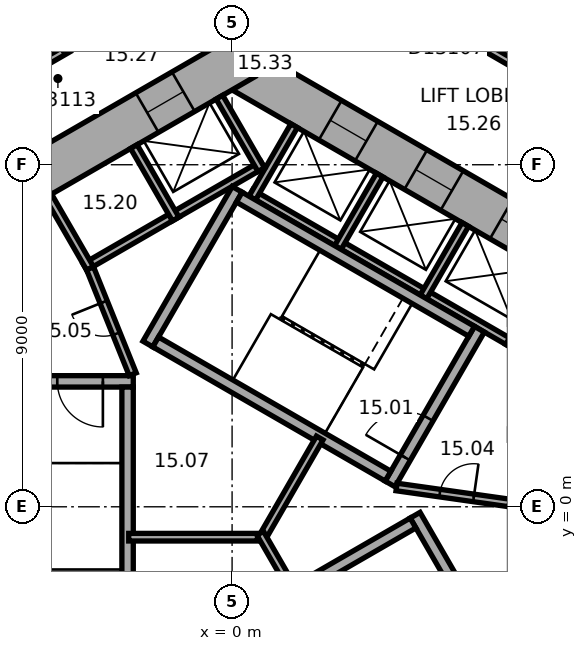
"""IFC4 building model, lengths in metres.
Left out: names, types, materials, properties, quantities, classifications, styles, units other than length and angle.
Written with IfcOpenShell. Run it as: python <this file> out.ifc"""

import sys

from ifc_helpers import new_model, si_unit, direction, frame, frame_2d, origin, place, context, subcontext, project, spatial, rectangle, extrude, element, fill, save


model = new_model("IFC4")
c1 = context("Model", 3, precision=1e-05, world=origin(), true_north=direction((0.0, 1.0)))
c2 = subcontext(c1, "Body", "Model", "MODEL_VIEW")
j1 = project(units=[si_unit("LENGTHUNIT", "METRE"), si_unit("PLANEANGLEUNIT", "RADIAN")], contexts=[c1])
p1 = place(None, origin())
s1 = spatial("IfcSite", under=j1, at=p1, CompositionType="ELEMENT")
p2 = place(p1, origin())
s2 = spatial("IfcBuilding", under=s1, at=p2, CompositionType="ELEMENT")
p3 = place(p2, frame((0.0, 0.0, 70.4)))
s3 = spatial("IfcBuildingStorey", under=s2, at=p3, CompositionType="ELEMENT", Elevation=70.4)
p4 = place(p3, frame((10.4, 5.658, 0.0), z_axis=(0.0, 0.0, 1.0), x_axis=(-0.866021384402, 0.500006961711, 0.0)))
e1 = element("IfcWall", 1, at=p4, inside=s3, PredefinedType="SHEAR", context=c2, shape_type="SweptSolid", body=[
    extrude(rectangle(XDim=12.355, YDim=1.2, at=frame_2d((6.178, 0.0))), origin(), (0.0, 0.0, 1.0), 3.3),
])
p5 = place(p4, frame((2.728, 0.0, 0.0)))
e2 = element("IfcOpeningElement", 2, at=p5, cuts=e1, PredefinedType="OPENING", context=c2, shape_type="SweptSolid", body=[
    extrude(rectangle(XDim=1.1, YDim=2.1, at=frame_2d((0.55, 1.05))), frame((0.0, 0.61, 0.0), z_axis=(0.0, -1.0, 0.0), x_axis=(1.0, 0.0, 0.0)), (0.0, 0.0, 1.0), 1.22),
])
p6 = place(p4, frame((5.328, 0.0, 0.0)))
e3 = element("IfcOpeningElement", 3, at=p6, cuts=e1, PredefinedType="OPENING", context=c2, shape_type="SweptSolid", body=[
    extrude(rectangle(XDim=1.1, YDim=2.1, at=frame_2d((0.55, 1.05))), frame((0.0, 0.61, 0.0), z_axis=(0.0, -1.0, 0.0), x_axis=(1.0, 0.0, 0.0)), (0.0, 0.0, 1.0), 1.22),
])
p7 = place(p4, frame((7.928, 0.0, 0.0)))
e4 = element("IfcOpeningElement", 4, at=p7, cuts=e1, PredefinedType="OPENING", context=c2, shape_type="SweptSolid", body=[
    extrude(rectangle(XDim=1.1, YDim=2.1, at=frame_2d((0.55, 1.05))), frame((0.0, 0.61, 0.0), z_axis=(0.0, -1.0, 0.0), x_axis=(1.0, 0.0, 0.0)), (0.0, 0.0, 1.0), 1.22),
])
p8 = place(p3, frame((0.3, 11.836, 0.0), z_axis=(0.0, 0.0, 1.0), x_axis=(-0.866021384402, -0.500006961711, 0.0)))
e5 = element("IfcWall", 5, at=p8, inside=s3, PredefinedType="SHEAR", context=c2, shape_type="SweptSolid", body=[
    extrude(rectangle(XDim=12.355, YDim=1.2, at=frame_2d((6.178, 0.0))), origin(), (0.0, 0.0, 1.0), 3.3),
])
p9 = place(p8, frame((6.378, 0.0, 0.0)))
e6 = element("IfcOpeningElement", 6, at=p9, cuts=e5, PredefinedType="OPENING", context=c2, shape_type="SweptSolid", body=[
    extrude(rectangle(XDim=1.5, YDim=2.1, at=frame_2d((0.75, 1.05))), frame((0.0, 0.61, 0.0), z_axis=(0.0, -1.0, 0.0), x_axis=(1.0, 0.0, 0.0)), (0.0, 0.0, 1.0), 1.22),
])
p10 = place(p8, frame((1.828, 0.0, 0.0)))
e7 = element("IfcOpeningElement", 7, at=p10, cuts=e5, PredefinedType="OPENING", context=c2, shape_type="SweptSolid", body=[
    extrude(rectangle(XDim=1.1, YDim=2.1, at=frame_2d((0.55, 1.05))), frame((0.0, 0.61, 0.0), z_axis=(0.0, -1.0, 0.0), x_axis=(1.0, 0.0, 0.0)), (0.0, 0.0, 1.0), 1.22),
])
p11 = place(p3, frame((7.424, 4.259, 0.0), z_axis=(0.0, 0.0, 1.0), x_axis=(-0.866026010844, 0.49999894854, 0.0)))
e8 = element("IfcWall", 8, at=p11, inside=s3, PredefinedType="PARTITIONING", context=c2, shape_type="SweptSolid", body=[
    extrude(rectangle(XDim=8.0, YDim=0.2, at=frame_2d((4.0, 0.0))), origin(), (0.0, 0.0, 1.0), 3.05),
])
for number, where, z_axis, x_axis in (
    (9, (7.287, 4.222, 0.0), (0.0, 0.0, 1.0), (0.5, 0.866, 0.0)),
    (10, (5.036, 5.522, 0.0), (0.0, 0.0, 1.0), (0.5, 0.866, 0.0)),
    (11, (2.784, 6.822, 0.0), (0.0, 0.0, 1.0), (0.5, 0.866, 0.0)),
    (12, (0.532, 8.122, 0.0), (0.0, 0.0, 1.0), (0.5, 0.866, 0.0)),
):
    element("IfcWall", number, at=place(p3, frame(where, z_axis=z_axis, x_axis=x_axis)), inside=s3, PredefinedType="PARTITIONING", context=c2, shape_type="SweptSolid", body=[
        extrude(rectangle(XDim=2.2, YDim=0.2, at=frame_2d((1.1, 0.0))), origin(), (0.0, 0.0, 1.0), 3.05),
    ])
p12 = place(p3, frame((0.803, 9.009, 0.0), z_axis=(0.0, 0.0, 1.0), x_axis=(-0.866028230842, -0.499995103361, 0.0)))
e13 = element("IfcWall", 13, at=p12, inside=s3, PredefinedType="PARTITIONING", context=c2, shape_type="SweptSolid", body=[
    extrude(rectangle(XDim=5.4, YDim=0.2, at=frame_2d((2.7, 0.0))), origin(), (0.0, 0.0, 1.0), 3.05),
])
p13 = place(p3, frame((0.767, 8.872, 0.0), z_axis=(0.0, 0.0, 1.0), x_axis=(-0.499994660107, 0.866028486751, 0.0)))
e14 = element("IfcWall", 14, at=p13, inside=s3, PredefinedType="PARTITIONING", context=c2, shape_type="SweptSolid", body=[
    extrude(rectangle(XDim=2.2, YDim=0.2, at=frame_2d((1.1, 0.0))), origin(), (0.0, 0.0, 1.0), 3.05),
])
for number, where, z_axis, x_axis in (
    (15, (-1.485, 7.572, 0.0), (0.0, 0.0, 1.0), (-0.5, 0.866, 0.0)),
    (16, (-3.737, 6.272, 0.0), (0.0, 0.0, 1.0), (-0.5, 0.866, 0.0)),
):
    element("IfcWall", number, at=place(p3, frame(where, z_axis=z_axis, x_axis=x_axis)), inside=s3, PredefinedType="PARTITIONING", context=c2, shape_type="SweptSolid", body=[
        extrude(rectangle(XDim=2.2, YDim=0.2, at=frame_2d((1.1, 0.0))), origin(), (0.0, 0.0, 1.0), 3.05),
    ])
p14 = place(p3, frame((4.158, 0.602, 0.0), z_axis=(0.0, 0.0, 1.0), x_axis=(0.499977259774, 0.866038532462, 0.0)))
e17 = element("IfcWall", 17, at=p14, inside=s3, PredefinedType="SHEAR", context=c2, shape_type="SweptSolid", body=[
    extrude(rectangle(XDim=4.7, YDim=0.3, at=frame_2d((2.35, 0.0))), origin(), (0.0, 0.0, 1.0), 3.05),
])
p15 = place(p14, frame((0.8, 0.0, 0.0)))
e18 = element("IfcOpeningElement", 18, at=p15, cuts=e17, PredefinedType="OPENING", context=c2, shape_type="SweptSolid", body=[
    extrude(rectangle(XDim=1.2, YDim=2.1, at=frame_2d((0.6, 1.05))), frame((0.0, 0.16, 0.0), z_axis=(0.0, -1.0, 0.0), x_axis=(1.0, 0.0, 0.0)), (0.0, 0.0, 1.0), 0.32),
])
p16 = place(p3, frame((-2.216, 4.282, 0.0), z_axis=(0.0, 0.0, 1.0), x_axis=(0.499977259774, 0.866038532462, 0.0)))
e19 = element("IfcWall", 19, at=p16, inside=s3, PredefinedType="SHEAR", context=c2, shape_type="SweptSolid", body=[
    extrude(rectangle(XDim=4.7, YDim=0.3, at=frame_2d((2.35, 0.0))), origin(), (0.0, 0.0, 1.0), 3.05),
])
for number, where, z_axis, x_axis in (
    (20, (4.103, 0.807, 0.0), (0.0, 0.0, 1.0), (-0.866, 0.5, 0.0)),
    (21, (6.303, 4.617, 0.0), (0.0, 0.0, 1.0), (-0.866, 0.5, 0.0)),
):
    element("IfcWall", number, at=place(p3, frame(where, z_axis=z_axis, x_axis=x_axis)), inside=s3, PredefinedType="SHEAR", context=c2, shape_type="SweptSolid", body=[
        extrude(rectangle(XDim=7.06, YDim=0.3, at=frame_2d((3.53, 0.0))), origin(), (0.0, 0.0, 1.0), 3.05),
    ])
p17 = place(p3, frame((-2.6, 3.3, 0.0), z_axis=(0.0, 0.0, 1.0), x_axis=(-1.0, 0.0, 0.0)))
e22 = element("IfcWall", 22, at=p17, inside=s3, PredefinedType="SHEAR", context=c2, shape_type="SweptSolid", body=[
    extrude(rectangle(XDim=4.7, YDim=0.3, at=frame_2d((2.35, 0.0))), origin(), (0.0, 0.0, 1.0), 3.05),
])
p18 = place(p17, frame((0.8, 0.0, 0.0)))
e23 = element("IfcOpeningElement", 23, at=p18, cuts=e22, PredefinedType="OPENING", context=c2, shape_type="SweptSolid", body=[
    extrude(rectangle(XDim=1.2, YDim=2.1, at=frame_2d((0.6, 1.05))), frame((0.0, 0.16, 0.0), z_axis=(0.0, -1.0, 0.0), x_axis=(1.0, 0.0, 0.0)), (0.0, 0.0, 1.0), 0.32),
])
p19 = place(p3, frame((-2.75, 3.15, 0.0), z_axis=(0.0, 0.0, 1.0), x_axis=(0.0, -1.0, 0.0)))
e24 = element("IfcWall", 24, at=p19, inside=s3, PredefinedType="SHEAR", context=c2, shape_type="SweptSolid", body=[
    extrude(rectangle(XDim=7.06, YDim=0.3, at=frame_2d((3.53, 0.0))), origin(), (0.0, 0.0, 1.0), 3.05),
])
p20 = place(p3, frame((4.816, -0.222, 0.0), z_axis=(0.0, 0.0, 1.0), x_axis=(0.499977259774, -0.866038532462, 0.0)))
e25 = element("IfcWall", 25, at=p20, inside=s3, PredefinedType="SHEAR", context=c2, shape_type="SweptSolid", body=[
    extrude(rectangle(XDim=4.7, YDim=0.3, at=frame_2d((2.35, 0.0))), origin(), (0.0, 0.0, 1.0), 3.05),
])
p21 = place(p3, frame((-1.353, -3.957, 0.0), z_axis=(0.0, 0.0, 1.0), x_axis=(0.866027801685, 0.499995846692, 0.0)))
e26 = element("IfcWall", 26, at=p21, inside=s3, PredefinedType="SHEAR", context=c2, shape_type="SweptSolid", body=[
    extrude(rectangle(XDim=7.06, YDim=0.3, at=frame_2d((3.53, 0.0))), origin(), (0.0, 0.0, 1.0), 3.05),
])
p22 = place(p3, frame((4.327, 0.521, 0.0), z_axis=(0.0, 0.0, 1.0), x_axis=(0.990124376366, -0.14019172346, 0.0)))
e27 = element("IfcWall", 27, at=p22, inside=s3, PredefinedType="PARTITIONING", context=c2, shape_type="SweptSolid", body=[
    extrude(rectangle(XDim=3.002, YDim=0.2, at=frame_2d((1.501, 0.0))), origin(), (0.0, 0.0, 1.0), 3.05),
])
p23 = place(p22, frame((1.15, 0.0, 0.0)))
e28 = element("IfcOpeningElement", 28, at=p23, cuts=e27, PredefinedType="OPENING", context=c2, shape_type="SweptSolid", body=[
    extrude(rectangle(XDim=0.9, YDim=2.1, at=frame_2d((0.45, 1.05))), frame((0.0, 0.11, 0.0), z_axis=(0.0, -1.0, 0.0), x_axis=(1.0, 0.0, 0.0)), (0.0, 0.0, 1.0), 0.22),
])
p24 = place(p3, frame((-2.615, 3.487, 0.0), z_axis=(0.0, 0.0, 1.0), x_axis=(-0.373576831041, 0.92759924068, 0.0)))
e29 = element("IfcWall", 29, at=p24, inside=s3, PredefinedType="PARTITIONING", context=c2, shape_type="SweptSolid", body=[
    extrude(rectangle(XDim=3.002, YDim=0.2, at=frame_2d((1.501, 0.0))), origin(), (0.0, 0.0, 1.0), 3.05),
])
p25 = place(p24, frame((1.15, 0.0, 0.0)))
e30 = element("IfcOpeningElement", 30, at=p25, cuts=e29, PredefinedType="OPENING", context=c2, shape_type="SweptSolid", body=[
    extrude(rectangle(XDim=0.9, YDim=2.1, at=frame_2d((0.45, 1.05))), frame((0.0, 0.11, 0.0), z_axis=(0.0, -1.0, 0.0), x_axis=(1.0, 0.0, 0.0)), (0.0, 0.0, 1.0), 0.22),
])
p26 = place(p3, frame((0.92, -0.8, 0.0), z_axis=(0.0, 0.0, 1.0), x_axis=(-1.0, 0.0, 0.0)))
e31 = element("IfcWall", 31, at=p26, inside=s3, PredefinedType="PARTITIONING", context=c2, shape_type="SweptSolid", body=[
    extrude(rectangle(XDim=3.64, YDim=0.2, at=frame_2d((1.82, 0.0))), origin(), (0.0, 0.0, 1.0), 3.05),
])
p27 = place(p3, frame((0.74, -0.904, 0.0), z_axis=(0.0, 0.0, 1.0), x_axis=(0.500028278809, 0.866009076391, 0.0)))
e32 = element("IfcWall", 32, at=p27, inside=s3, PredefinedType="PARTITIONING", context=c2, shape_type="SweptSolid", body=[
    extrude(rectangle(XDim=3.133, YDim=0.2, at=frame_2d((1.566, 0.0))), origin(), (0.0, 0.0, 1.0), 3.05),
])
p28 = place(p3, frame((0.74, -0.696, 0.0), z_axis=(0.0, 0.0, 1.0), x_axis=(0.499956301907, -0.86605063142, 0.0)))
e33 = element("IfcWall", 33, at=p28, inside=s3, PredefinedType="PARTITIONING", context=c2, shape_type="SweptSolid", body=[
    extrude(rectangle(XDim=1.747, YDim=0.2, at=frame_2d((0.874, 0.0))), origin(), (0.0, 0.0, 1.0), 3.05),
])
p29 = place(p3, frame((-4.309, 12.061, 0.0), z_axis=(0.0, 0.0, 1.0), x_axis=(-0.866020679205, -0.500008183122, 0.0)))
e34 = element("IfcWall", 34, at=p29, inside=s3, PredefinedType="PARTITIONING", context=c2, shape_type="SweptSolid", body=[
    extrude(rectangle(XDim=5.104, YDim=0.2, at=frame_2d((2.552, 0.0))), origin(), (0.0, 0.0, 1.0), 3.05),
])
p30 = place(p29, frame((0.185, 0.0, 0.0)))
e35 = element("IfcOpeningElement", 35, at=p30, cuts=e34, PredefinedType="OPENING", context=c2, shape_type="SweptSolid", body=[
    extrude(rectangle(XDim=0.9, YDim=2.1, at=frame_2d((0.45, 1.05))), frame((0.0, 0.11, 0.0), z_axis=(0.0, -1.0, 0.0), x_axis=(1.0, 0.0, 0.0)), (0.0, 0.0, 1.0), 0.22),
])
p31 = place(p29, frame((2.736, 0.0, 0.0)))
e36 = element("IfcOpeningElement", 36, at=p31, cuts=e34, PredefinedType="OPENING", context=c2, shape_type="SweptSolid", body=[
    extrude(rectangle(XDim=0.9, YDim=2.1, at=frame_2d((0.45, 1.05))), frame((0.0, 0.11, 0.0), z_axis=(0.0, -1.0, 0.0), x_axis=(1.0, 0.0, 0.0)), (0.0, 0.0, 1.0), 0.22),
])
p32 = place(p3, frame((10.885, 9.652, 0.0), z_axis=(0.0, 0.0, 1.0), x_axis=(-0.866033868542, 0.499985338323, 0.0)))
e37 = element("IfcWall", 37, at=p32, inside=s3, PredefinedType="PARTITIONING", context=c2, shape_type="SweptSolid", body=[
    extrude(rectangle(XDim=8.602, YDim=0.2, at=frame_2d((4.301, 0.0))), origin(), (0.0, 0.0, 1.0), 3.05),
])
p33 = place(p32, frame((5.302, 0.0, 0.0)))
e38 = element("IfcOpeningElement", 38, at=p33, cuts=e37, PredefinedType="OPENING", context=c2, shape_type="SweptSolid", body=[
    extrude(rectangle(XDim=0.9, YDim=2.1, at=frame_2d((0.45, 1.05))), frame((0.0, 0.11, 0.0), z_axis=(0.0, -1.0, 0.0), x_axis=(1.0, 0.0, 0.0)), (0.0, 0.0, 1.0), 0.22),
])
p34 = place(p15, origin())
e39 = element("IfcDoor", 39, at=p34, inside=s3, OperationType="SINGLE_SWING_RIGHT", PredefinedType="DOOR", context=c2, shape_type="SweptSolid", body=[
    extrude(rectangle(XDim=1.2, YDim=2.1, at=frame_2d((0.6, 1.05))), frame((0.0, 0.025, 0.0), z_axis=(0.0, -1.0, 0.0), x_axis=(1.0, 0.0, 0.0)), (0.0, 0.0, 1.0), 0.05),
])
fill(e18, e39)
p35 = place(p18, origin())
e40 = element("IfcDoor", 40, at=p35, inside=s3, OperationType="SINGLE_SWING_RIGHT", PredefinedType="DOOR", context=c2, shape_type="SweptSolid", body=[
    extrude(rectangle(XDim=1.2, YDim=2.1, at=frame_2d((0.6, 1.05))), frame((0.0, 0.025, 0.0), z_axis=(0.0, -1.0, 0.0), x_axis=(1.0, 0.0, 0.0)), (0.0, 0.0, 1.0), 0.05),
])
fill(e23, e40)
p36 = place(p23, origin())
e41 = element("IfcDoor", 41, at=p36, inside=s3, OperationType="SINGLE_SWING_LEFT", PredefinedType="DOOR", context=c2, shape_type="SweptSolid", body=[
    extrude(rectangle(XDim=0.9, YDim=2.1, at=frame_2d((0.45, 1.05))), frame((0.0, 0.025, 0.0), z_axis=(0.0, -1.0, 0.0), x_axis=(1.0, 0.0, 0.0)), (0.0, 0.0, 1.0), 0.05),
])
fill(e28, e41)
p37 = place(p25, origin())
e42 = element("IfcDoor", 42, at=p37, inside=s3, OperationType="SINGLE_SWING_LEFT", PredefinedType="DOOR", context=c2, shape_type="SweptSolid", body=[
    extrude(rectangle(XDim=0.9, YDim=2.1, at=frame_2d((0.45, 1.05))), frame((0.0, 0.025, 0.0), z_axis=(0.0, -1.0, 0.0), x_axis=(1.0, 0.0, 0.0)), (0.0, 0.0, 1.0), 0.05),
])
fill(e30, e42)
p38 = place(p5, origin())
e43 = element("IfcDoor", 43, at=p38, inside=s3, OperationType="DOUBLE_DOOR_SLIDING", PredefinedType="DOOR", context=c2, shape_type="SweptSolid", body=[
    extrude(rectangle(XDim=1.1, YDim=2.1, at=frame_2d((0.55, 1.05))), frame((0.0, 0.025, 0.0), z_axis=(0.0, -1.0, 0.0), x_axis=(1.0, 0.0, 0.0)), (0.0, 0.0, 1.0), 0.05),
])
fill(e2, e43)
p39 = place(p6, origin())
e44 = element("IfcDoor", 44, at=p39, inside=s3, OperationType="DOUBLE_DOOR_SLIDING", PredefinedType="DOOR", context=c2, shape_type="SweptSolid", body=[
    extrude(rectangle(XDim=1.1, YDim=2.1, at=frame_2d((0.55, 1.05))), frame((0.0, 0.025, 0.0), z_axis=(0.0, -1.0, 0.0), x_axis=(1.0, 0.0, 0.0)), (0.0, 0.0, 1.0), 0.05),
])
fill(e3, e44)
p40 = place(p7, origin())
e45 = element("IfcDoor", 45, at=p40, inside=s3, OperationType="DOUBLE_DOOR_SLIDING", PredefinedType="DOOR", context=c2, shape_type="SweptSolid", body=[
    extrude(rectangle(XDim=1.1, YDim=2.1, at=frame_2d((0.55, 1.05))), frame((0.0, 0.025, 0.0), z_axis=(0.0, -1.0, 0.0), x_axis=(1.0, 0.0, 0.0)), (0.0, 0.0, 1.0), 0.05),
])
fill(e4, e45)
p41 = place(p10, origin())
e46 = element("IfcDoor", 46, at=p41, inside=s3, OperationType="DOUBLE_DOOR_SLIDING", PredefinedType="DOOR", context=c2, shape_type="SweptSolid", body=[
    extrude(rectangle(XDim=1.1, YDim=2.1, at=frame_2d((0.55, 1.05))), frame((0.0, 0.025, 0.0), z_axis=(0.0, -1.0, 0.0), x_axis=(1.0, 0.0, 0.0)), (0.0, 0.0, 1.0), 0.05),
])
fill(e7, e46)
p42 = place(p30, origin())
e47 = element("IfcDoor", 47, at=p42, inside=s3, OperationType="SINGLE_SWING_LEFT", PredefinedType="DOOR", context=c2, shape_type="SweptSolid", body=[
    extrude(rectangle(XDim=0.9, YDim=2.1, at=frame_2d((0.45, 1.05))), frame((0.0, 0.025, 0.0), z_axis=(0.0, -1.0, 0.0), x_axis=(1.0, 0.0, 0.0)), (0.0, 0.0, 1.0), 0.05),
])
fill(e35, e47)
save(model, sys.argv[1])
